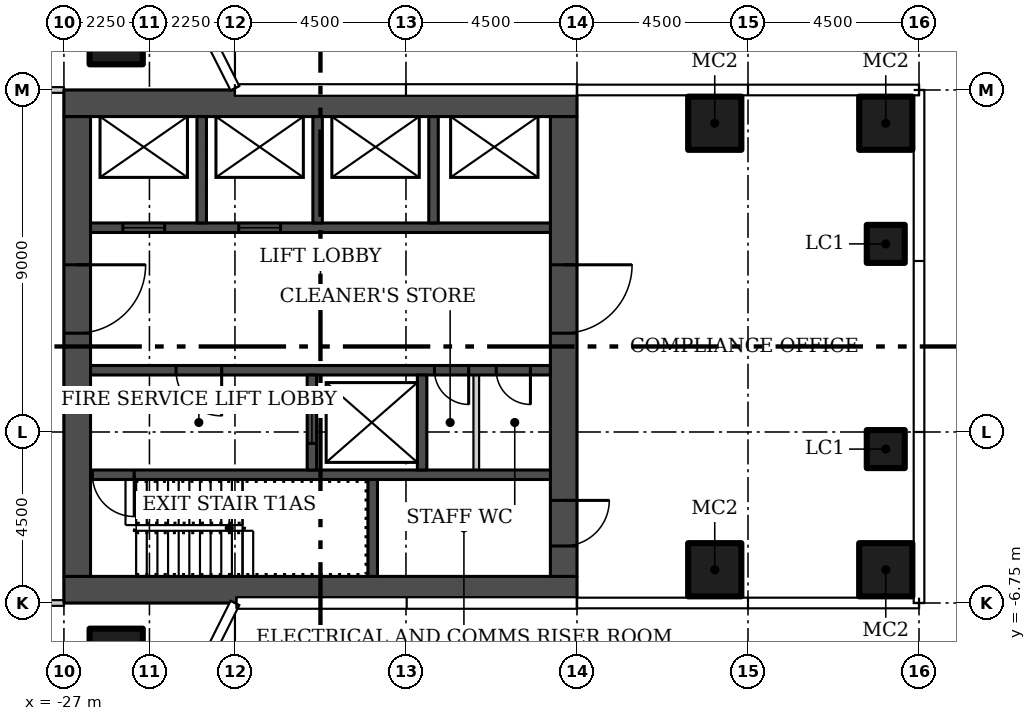
"""IFC4 building model, lengths in metres.
Left out: names, types, materials, properties, quantities, classifications, styles, units other than length and angle.
Written with IfcOpenShell. Run it as: python <this file> out.ifc"""

import sys

from ifc_helpers import new_model, si_unit, direction, frame, frame_2d, origin, origin_2d, place, context, subcontext, project, spatial, rectangle, hollow_rectangle, extrude, element, fill, save


model = new_model("IFC4")
c1 = context("Model", 3, precision=1e-05, world=origin(), true_north=direction((0.0, 1.0)))
c2 = subcontext(c1, "Body", "Model", "MODEL_VIEW")
j1 = project(units=[si_unit("LENGTHUNIT", "METRE"), si_unit("PLANEANGLEUNIT", "RADIAN")], contexts=[c1])
p1 = place(None, origin())
s1 = spatial("IfcSite", under=j1, at=p1, CompositionType="ELEMENT")
p2 = place(p1, origin())
s2 = spatial("IfcBuilding", under=s1, at=p2, CompositionType="ELEMENT")
p3 = place(p2, frame((0.0, 0.0, 61.5)))
s3 = spatial("IfcBuildingStorey", under=s2, at=p3, CompositionType="ELEMENT", Elevation=61.5)
for number, where in (
    (1, (-25.625, 8.125, 0.0)),
    (2, (-25.625, -8.125, 0.0)),
    (3, (-9.875, -5.875, 0.0)),
    (4, (-5.375, -5.875, 0.0)),
    (5, (-9.875, 5.875, 0.0)),
    (6, (-5.375, 5.875, 0.0)),
):
    element("IfcColumn", number, at=place(p3, frame(where)), inside=s3, PredefinedType="COLUMN", context=c2, shape_type="SweptSolid", body=[
        extrude(hollow_rectangle(XDim=1.4, YDim=1.4, WallThickness=0.05, at=origin_2d()), origin(), (0.0, 0.0, 1.0), 3.55),
    ])
for number, where in (
    (7, (-5.375, -2.7, 0.0)),
    (8, (-5.375, 2.7, 0.0)),
):
    element("IfcColumn", number, at=place(p3, frame(where)), inside=s3, PredefinedType="COLUMN", context=c2, shape_type="SweptSolid", body=[
        extrude(hollow_rectangle(XDim=1.0, YDim=1.0, WallThickness=0.04, at=origin_2d()), origin(), (0.0, 0.0, 1.0), 3.55),
    ])
p4 = place(p3, frame((-40.5, 6.75, 0.0)))
e9 = element("IfcWall", 9, at=p4, inside=s3, PredefinedType="PARTITIONING", context=c2, shape_type="SweptSolid", body=[
    extrude(rectangle(XDim=13.5, YDim=0.15, at=frame_2d((6.75, 0.0))), origin(), (0.0, 0.0, 1.0), 3.55),
])
p5 = place(p4, frame((6.0, 0.0, 0.0)))
e10 = element("IfcOpeningElement", 10, at=p5, cuts=e9, PredefinedType="OPENING", context=c2, shape_type="SweptSolid", body=[
    extrude(rectangle(XDim=1.5, YDim=2.1, at=frame_2d((0.75, 1.05))), frame((0.0, 0.085, 0.0), z_axis=(0.0, -1.0, 0.0), x_axis=(1.0, 0.0, 0.0)), (0.0, 0.0, 1.0), 0.17),
])
p6 = place(p3, frame((-27.0, -6.75, 0.0), z_axis=(0.0, 0.0, 1.0), x_axis=(-1.0, 0.0, 0.0)))
e11 = element("IfcWall", 11, at=p6, inside=s3, PredefinedType="PARTITIONING", context=c2, shape_type="SweptSolid", body=[
    extrude(rectangle(XDim=13.5, YDim=0.15, at=frame_2d((6.75, 0.0))), origin(), (0.0, 0.0, 1.0), 3.55),
])
p7 = place(p6, frame((3.75, 0.0, 0.0)))
e12 = element("IfcOpeningElement", 12, at=p7, cuts=e11, PredefinedType="OPENING", context=c2, shape_type="SweptSolid", body=[
    extrude(rectangle(XDim=1.5, YDim=2.1, at=frame_2d((0.75, 1.05))), frame((0.0, 0.085, 0.0), z_axis=(0.0, -1.0, 0.0), x_axis=(1.0, 0.0, 0.0)), (0.0, 0.0, 1.0), 0.17),
])
p8 = place(p6, frame((10.5, 0.0, 0.0)))
e13 = element("IfcOpeningElement", 13, at=p8, cuts=e11, PredefinedType="OPENING", context=c2, shape_type="SweptSolid", body=[
    extrude(rectangle(XDim=1.5, YDim=2.1, at=frame_2d((0.75, 1.05))), frame((0.0, 0.085, 0.0), z_axis=(0.0, -1.0, 0.0), x_axis=(1.0, 0.0, 0.0)), (0.0, 0.0, 1.0), 0.17),
])
for number, where in (
    (14, (-27.0, -6.4, 0.0)),
    (15, (-27.0, 6.4, 0.0)),
):
    element("IfcWall", number, at=place(p3, frame(where)), inside=s3, PredefinedType="SHEAR", context=c2, shape_type="SweptSolid", body=[
        extrude(rectangle(XDim=13.5, YDim=0.7, at=frame_2d((6.75, 0.0))), origin(), (0.0, 0.0, 1.0), 3.55),
    ])
p9 = place(p3, frame((-26.65, 6.05, 0.0), z_axis=(0.0, 0.0, 1.0), x_axis=(0.0, -1.0, 0.0)))
e16 = element("IfcWall", 16, at=p9, inside=s3, PredefinedType="SHEAR", context=c2, shape_type="SweptSolid", body=[
    extrude(rectangle(XDim=12.1, YDim=0.7, at=frame_2d((6.05, 0.0))), origin(), (0.0, 0.0, 1.0), 3.55),
])
p10 = place(p9, frame((3.9, 0.0, 0.0)))
e17 = element("IfcOpeningElement", 17, at=p10, cuts=e16, PredefinedType="OPENING", context=c2, shape_type="SweptSolid", body=[
    extrude(rectangle(XDim=1.8, YDim=2.4, at=frame_2d((0.9, 1.2))), frame((0.0, 0.36, 0.0), z_axis=(0.0, -1.0, 0.0), x_axis=(1.0, 0.0, 0.0)), (0.0, 0.0, 1.0), 0.72),
])
p11 = place(p3, frame((-13.85, 6.05, 0.0), z_axis=(0.0, 0.0, 1.0), x_axis=(0.0, -1.0, 0.0)))
e18 = element("IfcWall", 18, at=p11, inside=s3, PredefinedType="SHEAR", context=c2, shape_type="SweptSolid", body=[
    extrude(rectangle(XDim=12.1, YDim=0.7, at=frame_2d((6.05, 0.0))), origin(), (0.0, 0.0, 1.0), 3.55),
])
p12 = place(p11, frame((10.1, 0.0, 0.0)))
e19 = element("IfcOpeningElement", 19, at=p12, cuts=e18, PredefinedType="OPENING", context=c2, shape_type="SweptSolid", body=[
    extrude(rectangle(XDim=1.2, YDim=2.1, at=frame_2d((0.6, 1.05))), frame((0.0, 0.36, 0.0), z_axis=(0.0, -1.0, 0.0), x_axis=(1.0, 0.0, 0.0)), (0.0, 0.0, 1.0), 0.72),
])
p13 = place(p11, frame((3.9, 0.0, 0.0)))
e20 = element("IfcOpeningElement", 20, at=p13, cuts=e18, PredefinedType="OPENING", context=c2, shape_type="SweptSolid", body=[
    extrude(rectangle(XDim=1.8, YDim=2.4, at=frame_2d((0.9, 1.2))), frame((0.0, 0.36, 0.0), z_axis=(0.0, -1.0, 0.0), x_axis=(1.0, 0.0, 0.0)), (0.0, 0.0, 1.0), 0.72),
])
p14 = place(p3, frame((-14.2, -3.375, 0.0), z_axis=(0.0, 0.0, 1.0), x_axis=(-1.0, 0.0, 0.0)))
e21 = element("IfcWall", 21, at=p14, inside=s3, PredefinedType="SHEAR", context=c2, shape_type="SweptSolid", body=[
    extrude(rectangle(XDim=12.1, YDim=0.25, at=frame_2d((6.05, 0.0))), origin(), (0.0, 0.0, 1.0), 3.55),
])
p15 = place(p14, frame((10.95, 0.0, 0.0)))
e22 = element("IfcOpeningElement", 22, at=p15, cuts=e21, PredefinedType="OPENING", context=c2, shape_type="SweptSolid", body=[
    extrude(rectangle(XDim=1.1, YDim=2.1, at=frame_2d((0.55, 1.05))), frame((0.0, 0.135, 0.0), z_axis=(0.0, -1.0, 0.0), x_axis=(1.0, 0.0, 0.0)), (0.0, 0.0, 1.0), 0.27),
])
p16 = place(p3, frame((-18.875, -6.05, 0.0), z_axis=(0.0, 0.0, 1.0), x_axis=(0.0, 1.0, 0.0)))
e23 = element("IfcWall", 23, at=p16, inside=s3, PredefinedType="SHEAR", context=c2, shape_type="SweptSolid", body=[
    extrude(rectangle(XDim=2.55, YDim=0.25, at=frame_2d((1.275, 0.0))), origin(), (0.0, 0.0, 1.0), 3.55),
])
p17 = place(p3, frame((-14.2, -0.625, 0.0), z_axis=(0.0, 0.0, 1.0), x_axis=(-1.0, 0.0, 0.0)))
e24 = element("IfcWall", 24, at=p17, inside=s3, PredefinedType="SHEAR", context=c2, shape_type="SweptSolid", body=[
    extrude(rectangle(XDim=12.1, YDim=0.25, at=frame_2d((6.05, 0.0))), origin(), (0.0, 0.0, 1.0), 3.55),
])
p18 = place(p17, frame((8.65, 0.0, 0.0)))
e25 = element("IfcOpeningElement", 25, at=p18, cuts=e24, PredefinedType="OPENING", context=c2, shape_type="SweptSolid", body=[
    extrude(rectangle(XDim=1.2, YDim=2.1, at=frame_2d((0.6, 1.05))), frame((0.0, 0.135, 0.0), z_axis=(0.0, -1.0, 0.0), x_axis=(1.0, 0.0, 0.0)), (0.0, 0.0, 1.0), 0.27),
])
p19 = place(p17, frame((2.15, 0.0, 0.0)))
e26 = element("IfcOpeningElement", 26, at=p19, cuts=e24, PredefinedType="OPENING", context=c2, shape_type="SweptSolid", body=[
    extrude(rectangle(XDim=0.9, YDim=2.1, at=frame_2d((0.45, 1.05))), frame((0.0, 0.135, 0.0), z_axis=(0.0, -1.0, 0.0), x_axis=(1.0, 0.0, 0.0)), (0.0, 0.0, 1.0), 0.27),
])
p20 = place(p17, frame((0.525, 0.0, 0.0)))
e27 = element("IfcOpeningElement", 27, at=p20, cuts=e24, PredefinedType="OPENING", context=c2, shape_type="SweptSolid", body=[
    extrude(rectangle(XDim=0.9, YDim=2.1, at=frame_2d((0.45, 1.05))), frame((0.0, 0.135, 0.0), z_axis=(0.0, -1.0, 0.0), x_axis=(1.0, 0.0, 0.0)), (0.0, 0.0, 1.0), 0.27),
])
p21 = place(p3, frame((-20.475, -3.25, 0.0), z_axis=(0.0, 0.0, 1.0), x_axis=(0.0, 1.0, 0.0)))
e28 = element("IfcWall", 28, at=p21, inside=s3, PredefinedType="SHEAR", context=c2, shape_type="SweptSolid", body=[
    extrude(rectangle(XDim=2.5, YDim=0.25, at=frame_2d((1.25, 0.0))), origin(), (0.0, 0.0, 1.0), 3.55),
])
p22 = place(p21, frame((0.7, 0.0, 0.0)))
e29 = element("IfcOpeningElement", 29, at=p22, cuts=e28, PredefinedType="OPENING", context=c2, shape_type="SweptSolid", body=[
    extrude(rectangle(XDim=1.1, YDim=2.1, at=frame_2d((0.55, 1.05))), frame((0.0, 0.135, 0.0), z_axis=(0.0, -1.0, 0.0), x_axis=(1.0, 0.0, 0.0)), (0.0, 0.0, 1.0), 0.27),
])
p23 = place(p3, frame((-17.575, -3.25, 0.0), z_axis=(0.0, 0.0, 1.0), x_axis=(0.0, 1.0, 0.0)))
e30 = element("IfcWall", 30, at=p23, inside=s3, PredefinedType="SHEAR", context=c2, shape_type="SweptSolid", body=[
    extrude(rectangle(XDim=2.5, YDim=0.25, at=frame_2d((1.25, 0.0))), origin(), (0.0, 0.0, 1.0), 3.55),
])
p24 = place(p3, frame((-16.15, -3.25, 0.0), z_axis=(0.0, 0.0, 1.0), x_axis=(0.0, 1.0, 0.0)))
e31 = element("IfcWall", 31, at=p24, inside=s3, PredefinedType="PARTITIONING", context=c2, shape_type="SweptSolid", body=[
    extrude(rectangle(XDim=2.5, YDim=0.15, at=frame_2d((1.25, 0.0))), origin(), (0.0, 0.0, 1.0), 3.55),
])
p25 = place(p3, frame((-26.3, 3.125, 0.0)))
e32 = element("IfcWall", 32, at=p25, inside=s3, PredefinedType="SHEAR", context=c2, shape_type="SweptSolid", body=[
    extrude(rectangle(XDim=12.1, YDim=0.25, at=frame_2d((6.05, 0.0))), origin(), (0.0, 0.0, 1.0), 3.55),
])
p26 = place(p25, frame((0.85, 0.0, 0.0)))
e33 = element("IfcOpeningElement", 33, at=p26, cuts=e32, PredefinedType="OPENING", context=c2, shape_type="SweptSolid", body=[
    extrude(rectangle(XDim=1.1, YDim=2.1, at=frame_2d((0.55, 1.05))), frame((0.0, 0.135, 0.0), z_axis=(0.0, -1.0, 0.0), x_axis=(1.0, 0.0, 0.0)), (0.0, 0.0, 1.0), 0.27),
])
p27 = place(p25, frame((3.9, 0.0, 0.0)))
e34 = element("IfcOpeningElement", 34, at=p27, cuts=e32, PredefinedType="OPENING", context=c2, shape_type="SweptSolid", body=[
    extrude(rectangle(XDim=1.1, YDim=2.1, at=frame_2d((0.55, 1.05))), frame((0.0, 0.135, 0.0), z_axis=(0.0, -1.0, 0.0), x_axis=(1.0, 0.0, 0.0)), (0.0, 0.0, 1.0), 0.27),
])
for number, where, z_axis, x_axis in (
    (35, (-23.375, 3.25, 0.0), (0.0, 0.0, 1.0), (0.0, 1.0, 0.0)),
    (36, (-20.325, 3.25, 0.0), (0.0, 0.0, 1.0), (0.0, 1.0, 0.0)),
    (37, (-17.275, 3.25, 0.0), (0.0, 0.0, 1.0), (0.0, 1.0, 0.0)),
):
    element("IfcWall", number, at=place(p3, frame(where, z_axis=z_axis, x_axis=x_axis)), inside=s3, PredefinedType="SHEAR", context=c2, shape_type="SweptSolid", body=[
        extrude(rectangle(XDim=2.8, YDim=0.25, at=frame_2d((1.4, 0.0))), origin(), (0.0, 0.0, 1.0), 3.55),
    ])
p28 = place(p10, origin())
e38 = element("IfcDoor", 38, at=p28, inside=s3, OperationType="DOUBLE_DOOR_SINGLE_SWING", PredefinedType="DOOR", context=c2, shape_type="SweptSolid", body=[
    extrude(rectangle(XDim=1.8, YDim=2.4, at=frame_2d((0.9, 1.2))), frame((0.0, 0.025, 0.0), z_axis=(0.0, -1.0, 0.0), x_axis=(1.0, 0.0, 0.0)), (0.0, 0.0, 1.0), 0.05),
])
fill(e17, e38)
p29 = place(p12, origin())
e39 = element("IfcDoor", 39, at=p29, inside=s3, OperationType="SINGLE_SWING_RIGHT", PredefinedType="DOOR", context=c2, shape_type="SweptSolid", body=[
    extrude(rectangle(XDim=1.2, YDim=2.1, at=frame_2d((0.6, 1.05))), frame((0.0, 0.025, 0.0), z_axis=(0.0, -1.0, 0.0), x_axis=(1.0, 0.0, 0.0)), (0.0, 0.0, 1.0), 0.05),
])
fill(e19, e39)
p30 = place(p13, origin())
e40 = element("IfcDoor", 40, at=p30, inside=s3, OperationType="DOUBLE_DOOR_SINGLE_SWING", PredefinedType="DOOR", context=c2, shape_type="SweptSolid", body=[
    extrude(rectangle(XDim=1.8, YDim=2.4, at=frame_2d((0.9, 1.2))), frame((0.0, 0.025, 0.0), z_axis=(0.0, -1.0, 0.0), x_axis=(1.0, 0.0, 0.0)), (0.0, 0.0, 1.0), 0.05),
])
fill(e20, e40)
p31 = place(p15, origin())
e41 = element("IfcDoor", 41, at=p31, inside=s3, OperationType="SINGLE_SWING_RIGHT", PredefinedType="DOOR", context=c2, shape_type="SweptSolid", body=[
    extrude(rectangle(XDim=1.1, YDim=2.1, at=frame_2d((0.55, 1.05))), frame((0.0, 0.025, 0.0), z_axis=(0.0, -1.0, 0.0), x_axis=(1.0, 0.0, 0.0)), (0.0, 0.0, 1.0), 0.05),
])
fill(e22, e41)
p32 = place(p18, origin())
e42 = element("IfcDoor", 42, at=p32, inside=s3, OperationType="SINGLE_SWING_RIGHT", PredefinedType="DOOR", context=c2, shape_type="SweptSolid", body=[
    extrude(rectangle(XDim=1.2, YDim=2.1, at=frame_2d((0.6, 1.05))), frame((0.0, 0.025, 0.0), z_axis=(0.0, -1.0, 0.0), x_axis=(1.0, 0.0, 0.0)), (0.0, 0.0, 1.0), 0.05),
])
fill(e25, e42)
p33 = place(p19, origin())
e43 = element("IfcDoor", 43, at=p33, inside=s3, OperationType="SINGLE_SWING_LEFT", PredefinedType="DOOR", context=c2, shape_type="SweptSolid", body=[
    extrude(rectangle(XDim=0.9, YDim=2.1, at=frame_2d((0.45, 1.05))), frame((0.0, 0.025, 0.0), z_axis=(0.0, -1.0, 0.0), x_axis=(1.0, 0.0, 0.0)), (0.0, 0.0, 1.0), 0.05),
])
fill(e26, e43)
p34 = place(p20, origin())
e44 = element("IfcDoor", 44, at=p34, inside=s3, OperationType="SINGLE_SWING_LEFT", PredefinedType="DOOR", context=c2, shape_type="SweptSolid", body=[
    extrude(rectangle(XDim=0.9, YDim=2.1, at=frame_2d((0.45, 1.05))), frame((0.0, 0.025, 0.0), z_axis=(0.0, -1.0, 0.0), x_axis=(1.0, 0.0, 0.0)), (0.0, 0.0, 1.0), 0.05),
])
fill(e27, e44)
p35 = place(p22, origin())
e45 = element("IfcDoor", 45, at=p35, inside=s3, OperationType="SLIDING_TO_LEFT", PredefinedType="DOOR", context=c2, shape_type="SweptSolid", body=[
    extrude(rectangle(XDim=1.1, YDim=2.1, at=frame_2d((0.55, 1.05))), frame((0.0, 0.025, 0.0), z_axis=(0.0, -1.0, 0.0), x_axis=(1.0, 0.0, 0.0)), (0.0, 0.0, 1.0), 0.05),
])
fill(e29, e45)
p36 = place(p26, origin())
e46 = element("IfcDoor", 46, at=p36, inside=s3, OperationType="SLIDING_TO_LEFT", PredefinedType="DOOR", context=c2, shape_type="SweptSolid", body=[
    extrude(rectangle(XDim=1.1, YDim=2.1, at=frame_2d((0.55, 1.05))), frame((0.0, 0.025, 0.0), z_axis=(0.0, -1.0, 0.0), x_axis=(1.0, 0.0, 0.0)), (0.0, 0.0, 1.0), 0.05),
])
fill(e33, e46)
p37 = place(p27, origin())
e47 = element("IfcDoor", 47, at=p37, inside=s3, OperationType="SLIDING_TO_LEFT", PredefinedType="DOOR", context=c2, shape_type="SweptSolid", body=[
    extrude(rectangle(XDim=1.1, YDim=2.1, at=frame_2d((0.55, 1.05))), frame((0.0, 0.025, 0.0), z_axis=(0.0, -1.0, 0.0), x_axis=(1.0, 0.0, 0.0)), (0.0, 0.0, 1.0), 0.05),
])
fill(e34, e47)
save(model, sys.argv[1])
